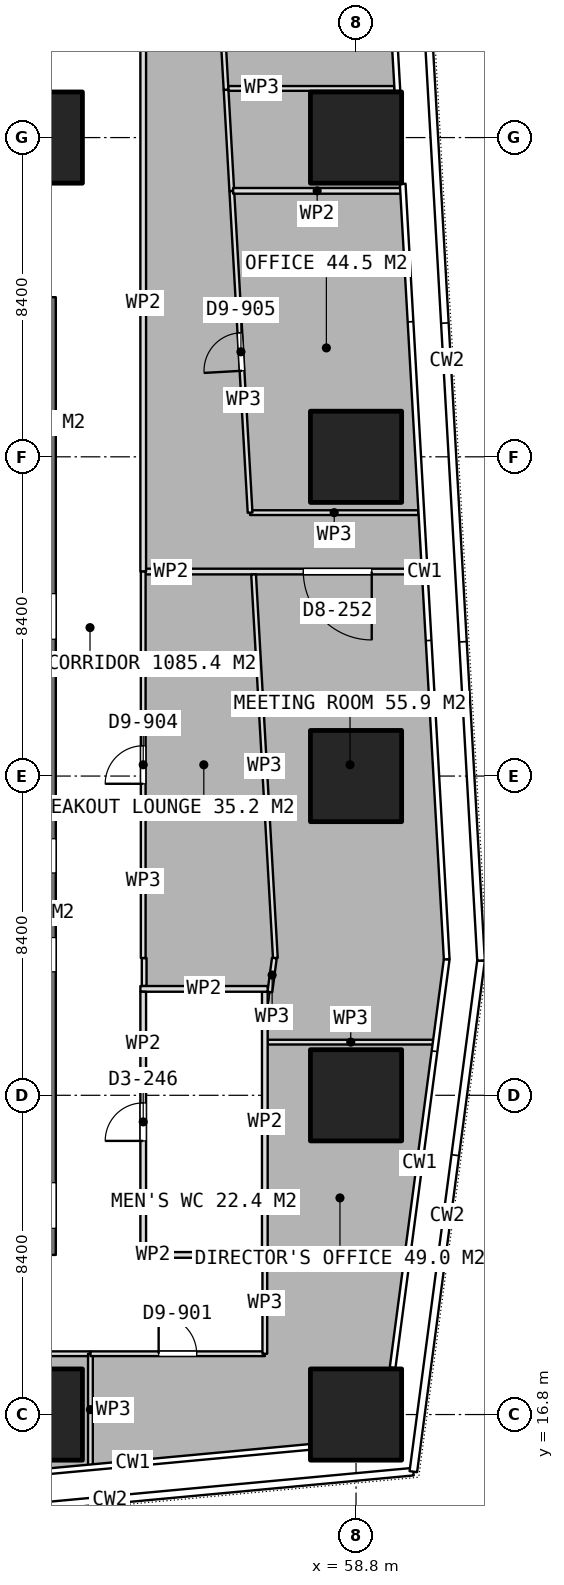
"""IFC4 building model, lengths in metres.
Left out: names, types, materials, properties, quantities, classifications, styles, units other than length and angle.
Written with IfcOpenShell. Run it as: python <this file> out.ifc"""

import sys

from ifc_helpers import new_model, si_unit, direction, frame, frame_2d, origin, origin_2d, place, context, subcontext, project, spatial, rectangle, extrude, element, fill, save


model = new_model("IFC4")
c1 = context("Model", 3, precision=1e-05, world=origin(), true_north=direction((0.0, 1.0)))
c2 = subcontext(c1, "Body", "Model", "MODEL_VIEW")
j1 = project(units=[si_unit("LENGTHUNIT", "METRE"), si_unit("PLANEANGLEUNIT", "RADIAN")], contexts=[c1])
p1 = place(None, origin())
s1 = spatial("IfcSite", under=j1, at=p1, CompositionType="ELEMENT")
p2 = place(p1, origin())
s2 = spatial("IfcBuilding", under=s1, at=p2, CompositionType="ELEMENT")
p3 = place(p2, frame((0.0, 0.0, 228.95)))
s3 = spatial("IfcBuildingStorey", under=s2, at=p3, CompositionType="ELEMENT", Elevation=228.95)
p4 = place(p3, frame((50.4, 21.0, 0.0), z_axis=(0.0, 0.0, 1.0), x_axis=(0.0, 1.0, 0.0)))
e1 = element("IfcWall", 1, at=p4, inside=s3, PredefinedType="SHEAR", context=c2, shape_type="SweptSolid", body=[
    extrude(rectangle(XDim=25.2, YDim=1.0, at=frame_2d((12.6, 0.0))), origin(), (0.0, 0.0, 1.0), 3.75),
])
p5 = place(p4, frame((16.2, 0.0, 0.0)))
e2 = element("IfcOpeningElement", 2, at=p5, cuts=e1, PredefinedType="OPENING", context=c2, shape_type="SweptSolid", body=[
    extrude(rectangle(XDim=1.2, YDim=2.1, at=frame_2d((0.6, 1.05))), frame((0.0, 0.51, 0.0), z_axis=(0.0, -1.0, 0.0), x_axis=(1.0, 0.0, 0.0)), (0.0, 0.0, 1.0), 1.02),
])
p6 = place(p4, frame((10.05, 0.0, 0.0)))
e3 = element("IfcOpeningElement", 3, at=p6, cuts=e1, PredefinedType="OPENING", context=c2, shape_type="SweptSolid", body=[
    extrude(rectangle(XDim=0.9, YDim=2.1, at=frame_2d((0.45, 1.05))), frame((0.0, 0.51, 0.0), z_axis=(0.0, -1.0, 0.0), x_axis=(1.0, 0.0, 0.0)), (0.0, 0.0, 1.0), 1.02),
])
p7 = place(p4, frame((7.45, 0.0, 0.0)))
e4 = element("IfcOpeningElement", 4, at=p7, cuts=e1, PredefinedType="OPENING", context=c2, shape_type="SweptSolid", body=[
    extrude(rectangle(XDim=0.9, YDim=2.1, at=frame_2d((0.45, 1.05))), frame((0.0, 0.51, 0.0), z_axis=(0.0, -1.0, 0.0), x_axis=(1.0, 0.0, 0.0)), (0.0, 0.0, 1.0), 1.02),
])
p8 = place(p4, frame((0.7, 0.0, 0.0)))
e5 = element("IfcOpeningElement", 5, at=p8, cuts=e1, PredefinedType="OPENING", context=c2, shape_type="SweptSolid", body=[
    extrude(rectangle(XDim=1.2, YDim=2.1, at=frame_2d((0.6, 1.05))), frame((0.0, 0.51, 0.0), z_axis=(0.0, -1.0, 0.0), x_axis=(1.0, 0.0, 0.0)), (0.0, 0.0, 1.0), 1.02),
])
for number, where, z_axis, x_axis in (
    (6, (50.4, 16.8, 0.0), (0.0, 0.0, 1.0), (1.0, 0.0, 0.0)),
    (7, (50.4, 50.4, 0.0), (0.0, 0.0, 1.0), (1.0, 0.0, 0.0)),
    (8, (58.8, 16.8, 0.0), (0.0, 0.0, 1.0), (1.0, 0.0, 0.0)),
    (9, (58.8, 25.2, 0.0), (0.0, 0.0, 1.0), (1.0, 0.0, 0.0)),
    (10, (58.8, 33.6, 0.0), (0.0, 0.0, 1.0), (1.0, 0.0, 0.0)),
    (11, (58.8, 42.0, 0.0), (0.0, 0.0, 1.0), (1.0, 0.0, 0.0)),
    (12, (58.8, 50.4, 0.0), (0.0, 0.0, 1.0), (1.0, 0.0, 0.0)),
):
    element("IfcColumn", number, at=place(p3, frame(where, z_axis=z_axis, x_axis=x_axis)), inside=s3, PredefinedType="COLUMN", context=c2, shape_type="SweptSolid", body=[
        extrude(rectangle(XDim=2.4, YDim=2.4, at=origin_2d()), origin(), (0.0, 0.0, 1.0), 3.75),
    ])
for number, where, z_axis, x_axis in (
    (13, (53.125, 21.0, 0.0), (0.0, 0.0, 1.0), (1.0, 0.0, 0.0)),
    (14, (53.125, 28.0, 0.0), (0.0, 0.0, 1.0), (1.0, 0.0, 0.0)),
):
    element("IfcWall", number, at=place(p3, frame(where, z_axis=z_axis, x_axis=x_axis)), inside=s3, PredefinedType="PARTITIONING", context=c2, shape_type="SweptSolid", body=[
        extrude(rectangle(XDim=3.35, YDim=0.15, at=frame_2d((1.675, 0.0))), origin(), (0.0, 0.0, 1.0), 3.5),
    ])
p9 = place(p3, frame((53.2, 21.075, 0.0), z_axis=(0.0, 0.0, 1.0), x_axis=(0.0, 1.0, 0.0)))
e15 = element("IfcWall", 15, at=p9, inside=s3, PredefinedType="PARTITIONING", context=c2, shape_type="SweptSolid", body=[
    extrude(rectangle(XDim=6.85, YDim=0.15, at=frame_2d((3.425, 0.0))), origin(), (0.0, 0.0, 1.0), 3.5),
])
p10 = place(p9, frame((2.925, 0.0, 0.0)))
e16 = element("IfcOpeningElement", 16, at=p10, cuts=e15, PredefinedType="OPENING", context=c2, shape_type="SweptSolid", body=[
    extrude(rectangle(XDim=1.0, YDim=2.1, at=frame_2d((0.5, 1.05))), frame((0.0, 0.085, 0.0), z_axis=(0.0, -1.0, 0.0), x_axis=(1.0, 0.0, 0.0)), (0.0, 0.0, 1.0), 0.17),
])
p11 = place(p3, frame((56.4, 21.075, 0.0), z_axis=(0.0, 0.0, 1.0), x_axis=(0.0, 1.0, 0.0)))
e17 = element("IfcWall", 17, at=p11, inside=s3, PredefinedType="PARTITIONING", context=c2, shape_type="SweptSolid", body=[
    extrude(rectangle(XDim=6.85, YDim=0.15, at=frame_2d((3.425, 0.0))), origin(), (0.0, 0.0, 1.0), 3.5),
])
p12 = place(p3, frame((23.944, 18.4, 0.0), z_axis=(0.0, 0.0, 1.0), x_axis=(1.0, 0.0, 0.0)))
e18 = element("IfcWall", 18, at=p12, inside=s3, PredefinedType="PARTITIONING", context=c2, shape_type="SweptSolid", body=[
    extrude(rectangle(XDim=27.867, YDim=0.125, at=frame_2d((13.934, 0.0))), origin(), (0.0, 0.0, 1.0), 3.5),
])
p13 = place(p12, frame((13.433, 0.0, 0.0)))
e19 = element("IfcOpeningElement", 19, at=p13, cuts=e18, PredefinedType="OPENING", context=c2, shape_type="SweptSolid", body=[
    extrude(rectangle(XDim=1.0, YDim=2.1, at=frame_2d((0.5, 1.05))), frame((0.0, 0.073, 0.0), z_axis=(0.0, -1.0, 0.0), x_axis=(1.0, 0.0, 0.0)), (0.0, 0.0, 1.0), 0.145),
])
p14 = place(p3, frame((51.811, 18.4, 0.0), z_axis=(0.0, 0.0, 1.0), x_axis=(0.0, -1.0, 0.0)))
e20 = element("IfcWall", 20, at=p14, inside=s3, PredefinedType="PARTITIONING", context=c2, shape_type="SweptSolid", body=[
    extrude(rectangle(XDim=2.94, YDim=0.125, at=frame_2d((1.47, 0.0))), origin(), (0.0, 0.0, 1.0), 3.5),
])
p15 = place(p3, frame((56.475, 26.599, 0.0), z_axis=(0.0, 0.0, 1.0), x_axis=(1.0, 0.0, 0.0)))
e21 = element("IfcWall", 21, at=p15, inside=s3, PredefinedType="PARTITIONING", context=c2, shape_type="SweptSolid", body=[
    extrude(rectangle(XDim=4.372, YDim=0.125, at=frame_2d((2.186, 0.0))), origin(), (0.0, 0.0, 1.0), 3.5),
])
p16 = place(p3, frame((51.812, 18.4, 0.0), z_axis=(0.0, 0.0, 1.0), x_axis=(1.0, 0.0, 0.0)))
e22 = element("IfcWall", 22, at=p16, inside=s3, PredefinedType="PARTITIONING", context=c2, shape_type="SweptSolid", body=[
    extrude(rectangle(XDim=4.588, YDim=0.125, at=frame_2d((2.294, 0.0))), origin(), (0.0, 0.0, 1.0), 3.5),
])
p17 = place(p16, frame((1.794, 0.0, 0.0)))
e23 = element("IfcOpeningElement", 23, at=p17, cuts=e22, PredefinedType="OPENING", context=c2, shape_type="SweptSolid", body=[
    extrude(rectangle(XDim=1.0, YDim=2.1, at=frame_2d((0.5, 1.05))), frame((0.0, 0.073, 0.0), z_axis=(0.0, -1.0, 0.0), x_axis=(1.0, 0.0, 0.0)), (0.0, 0.0, 1.0), 0.145),
])
p18 = place(p3, frame((56.4, 18.4, 0.0), z_axis=(0.0, 0.0, 1.0), x_axis=(0.0, 1.0, 0.0)))
e24 = element("IfcWall", 24, at=p18, inside=s3, PredefinedType="PARTITIONING", context=c2, shape_type="SweptSolid", body=[
    extrude(rectangle(XDim=2.675, YDim=0.125, at=frame_2d((1.337, 0.0))), origin(), (0.0, 0.0, 1.0), 3.5),
])
p19 = place(p3, frame((56.533, 27.918, 0.0), z_axis=(0.0, 0.0, 1.0), x_axis=(0.130903187638, 0.991395156064, 0.0)))
e25 = element("IfcWall", 25, at=p19, inside=s3, PredefinedType="PARTITIONING", context=c2, shape_type="SweptSolid", body=[
    extrude(rectangle(XDim=0.901, YDim=0.125, at=frame_2d((0.45, 0.0))), origin(), (0.0, 0.0, 1.0), 3.5),
])
p20 = place(p3, frame((55.441, 51.693, 0.0), z_axis=(0.0, 0.0, 1.0), x_axis=(1.0, 0.0, 0.0)))
e26 = element("IfcWall", 26, at=p20, inside=s3, PredefinedType="PARTITIONING", context=c2, shape_type="SweptSolid", body=[
    extrude(rectangle(XDim=4.365, YDim=0.125, at=frame_2d((2.183, 0.0))), origin(), (0.0, 0.0, 1.0), 3.5),
])
p21 = place(p3, frame((60.439, 40.531, 0.0), z_axis=(0.0, 0.0, 1.0), x_axis=(-1.0, 0.0, 0.0)))
e27 = element("IfcWall", 27, at=p21, inside=s3, PredefinedType="PARTITIONING", context=c2, shape_type="SweptSolid", body=[
    extrude(rectangle(XDim=4.427, YDim=0.125, at=frame_2d((2.213, 0.0))), origin(), (0.0, 0.0, 1.0), 3.5),
])
p22 = place(p3, frame((56.012, 40.531, 0.0), z_axis=(0.0, 0.0, 1.0), x_axis=(-0.056725059265, 0.998389837514, 0.0)))
e28 = element("IfcWall", 28, at=p22, inside=s3, PredefinedType="PARTITIONING", context=c2, shape_type="SweptSolid", body=[
    extrude(rectangle(XDim=8.479, YDim=0.125, at=frame_2d((4.239, 0.0))), origin(), (0.0, 0.0, 1.0), 3.5),
])
p23 = place(p22, frame((3.739, 0.0, 0.0)))
e29 = element("IfcOpeningElement", 29, at=p23, cuts=e28, PredefinedType="OPENING", context=c2, shape_type="SweptSolid", body=[
    extrude(rectangle(XDim=1.0, YDim=2.1, at=frame_2d((0.5, 1.05))), frame((0.0, 0.073, 0.0), z_axis=(0.0, -1.0, 0.0), x_axis=(1.0, 0.0, 0.0)), (0.0, 0.0, 1.0), 0.145),
])
p24 = place(p3, frame((55.531, 48.996, 0.0), z_axis=(0.0, 0.0, 1.0), x_axis=(-0.056702825143, 0.998391100532, 0.0)))
e30 = element("IfcWall", 30, at=p24, inside=s3, PredefinedType="PARTITIONING", context=c2, shape_type="SweptSolid", body=[
    extrude(rectangle(XDim=2.665, YDim=0.125, at=frame_2d((1.333, 0.0))), origin(), (0.0, 0.0, 1.0), 3.5),
])
p25 = place(p3, frame((55.38, 51.658, 0.0), z_axis=(0.0, 0.0, 1.0), x_axis=(-0.056660197754, 0.998393520607, 0.0)))
e31 = element("IfcWall", 31, at=p25, inside=s3, PredefinedType="PARTITIONING", context=c2, shape_type="SweptSolid", body=[
    extrude(rectangle(XDim=4.783, YDim=0.125, at=frame_2d((2.391, 0.0))), origin(), (0.0, 0.0, 1.0), 3.5),
])
p26 = place(p3, frame((55.566, 48.998, 0.0), z_axis=(0.0, 0.0, 1.0), x_axis=(1.0, 0.0, 0.0)))
e32 = element("IfcWall", 32, at=p26, inside=s3, PredefinedType="PARTITIONING", context=c2, shape_type="SweptSolid", body=[
    extrude(rectangle(XDim=4.422, YDim=0.15, at=frame_2d((2.211, 0.0))), origin(), (0.0, 0.0, 1.0), 3.5),
])
p27 = place(p3, frame((60.527, 38.981, 0.0), z_axis=(0.0, 0.0, 1.0), x_axis=(-1.0, 0.0, 0.0)))
e33 = element("IfcWall", 33, at=p27, inside=s3, PredefinedType="PARTITIONING", context=c2, shape_type="SweptSolid", body=[
    extrude(rectangle(XDim=7.327, YDim=0.15, at=frame_2d((3.664, 0.0))), origin(), (0.0, 0.0, 1.0), 3.5),
])
p28 = place(p27, frame((1.314, 0.0, 0.0)))
e34 = element("IfcOpeningElement", 34, at=p28, cuts=e33, PredefinedType="OPENING", context=c2, shape_type="SweptSolid", body=[
    extrude(rectangle(XDim=1.8, YDim=2.1, at=frame_2d((0.9, 1.05))), frame((0.0, 0.085, 0.0), z_axis=(0.0, -1.0, 0.0), x_axis=(1.0, 0.0, 0.0)), (0.0, 0.0, 1.0), 0.17),
])
p29 = place(p3, frame((53.2, 38.981, 0.0), z_axis=(0.0, 0.0, 1.0), x_axis=(0.0, 1.0, 0.0)))
e35 = element("IfcWall", 35, at=p29, inside=s3, PredefinedType="PARTITIONING", context=c2, shape_type="SweptSolid", body=[
    extrude(rectangle(XDim=14.119, YDim=0.15, at=frame_2d((7.06, 0.0))), origin(), (0.0, 0.0, 1.0), 3.5),
])
p30 = place(p3, frame((56.677, 28.812, 0.0), z_axis=(0.0, 0.0, 1.0), x_axis=(-0.056674993877, 0.998392680797, 0.0)))
e36 = element("IfcWall", 36, at=p30, inside=s3, PredefinedType="PARTITIONING", context=c2, shape_type="SweptSolid", body=[
    extrude(rectangle(XDim=10.11, YDim=0.125, at=frame_2d((5.055, 0.0))), origin(), (0.0, 0.0, 1.0), 3.5),
])
p31 = place(p3, frame((53.225, 28.075, 0.0), z_axis=(0.0, 0.0, 1.0), x_axis=(0.0, 1.0, 0.0)))
e37 = element("IfcWall", 37, at=p31, inside=s3, PredefinedType="PARTITIONING", context=c2, shape_type="SweptSolid", body=[
    extrude(rectangle(XDim=0.737, YDim=0.125, at=frame_2d((0.369, 0.0))), origin(), (0.0, 0.0, 1.0), 3.5),
])
p32 = place(p3, frame((53.2, 28.812, 0.0), z_axis=(0.0, 0.0, 1.0), x_axis=(0.0, 1.0, 0.0)))
e38 = element("IfcWall", 38, at=p32, inside=s3, PredefinedType="PARTITIONING", context=c2, shape_type="SweptSolid", body=[
    extrude(rectangle(XDim=10.169, YDim=0.125, at=frame_2d((5.084, 0.0))), origin(), (0.0, 0.0, 1.0), 3.5),
])
p33 = place(p32, frame((4.585, 0.0, 0.0)))
e39 = element("IfcOpeningElement", 39, at=p33, cuts=e38, PredefinedType="OPENING", context=c2, shape_type="SweptSolid", body=[
    extrude(rectangle(XDim=1.0, YDim=2.1, at=frame_2d((0.5, 1.05))), frame((0.0, 0.073, 0.0), z_axis=(0.0, -1.0, 0.0), x_axis=(1.0, 0.0, 0.0)), (0.0, 0.0, 1.0), 0.145),
])
p34 = place(p10, origin())
e40 = element("IfcDoor", 40, at=p34, inside=s3, OperationType="SINGLE_SWING_LEFT", PredefinedType="DOOR", context=c2, shape_type="SweptSolid", body=[
    extrude(rectangle(XDim=1.0, YDim=2.1, at=frame_2d((0.5, 1.05))), frame((0.0, 0.025, 0.0), z_axis=(0.0, -1.0, 0.0), x_axis=(1.0, 0.0, 0.0)), (0.0, 0.0, 1.0), 0.05),
])
fill(e16, e40)
p35 = place(p17, origin())
e41 = element("IfcDoor", 41, at=p35, inside=s3, OperationType="SINGLE_SWING_LEFT", PredefinedType="DOOR", context=c2, shape_type="SweptSolid", body=[
    extrude(rectangle(XDim=1.0, YDim=2.1, at=frame_2d((0.5, 1.05))), frame((0.0, 0.025, 0.0), z_axis=(0.0, -1.0, 0.0), x_axis=(1.0, 0.0, 0.0)), (0.0, 0.0, 1.0), 0.05),
])
fill(e23, e41)
p36 = place(p23, origin())
e42 = element("IfcDoor", 42, at=p36, inside=s3, OperationType="SINGLE_SWING_LEFT", PredefinedType="DOOR", context=c2, shape_type="SweptSolid", body=[
    extrude(rectangle(XDim=1.0, YDim=2.1, at=frame_2d((0.5, 1.05))), frame((0.0, 0.025, 0.0), z_axis=(0.0, -1.0, 0.0), x_axis=(1.0, 0.0, 0.0)), (0.0, 0.0, 1.0), 0.05),
])
fill(e29, e42)
p37 = place(p28, origin())
e43 = element("IfcDoor", 43, at=p37, inside=s3, OperationType="DOUBLE_DOOR_SINGLE_SWING", PredefinedType="DOOR", context=c2, shape_type="SweptSolid", body=[
    extrude(rectangle(XDim=1.8, YDim=2.1, at=frame_2d((0.9, 1.05))), frame((0.0, 0.025, 0.0), z_axis=(0.0, -1.0, 0.0), x_axis=(1.0, 0.0, 0.0)), (0.0, 0.0, 1.0), 0.05),
])
fill(e34, e43)
p38 = place(p33, origin())
e44 = element("IfcDoor", 44, at=p38, inside=s3, OperationType="SINGLE_SWING_LEFT", PredefinedType="DOOR", context=c2, shape_type="SweptSolid", body=[
    extrude(rectangle(XDim=1.0, YDim=2.1, at=frame_2d((0.5, 1.05))), frame((0.0, 0.025, 0.0), z_axis=(0.0, -1.0, 0.0), x_axis=(1.0, 0.0, 0.0)), (0.0, 0.0, 1.0), 0.05),
])
fill(e39, e44)
save(model, sys.argv[1])
